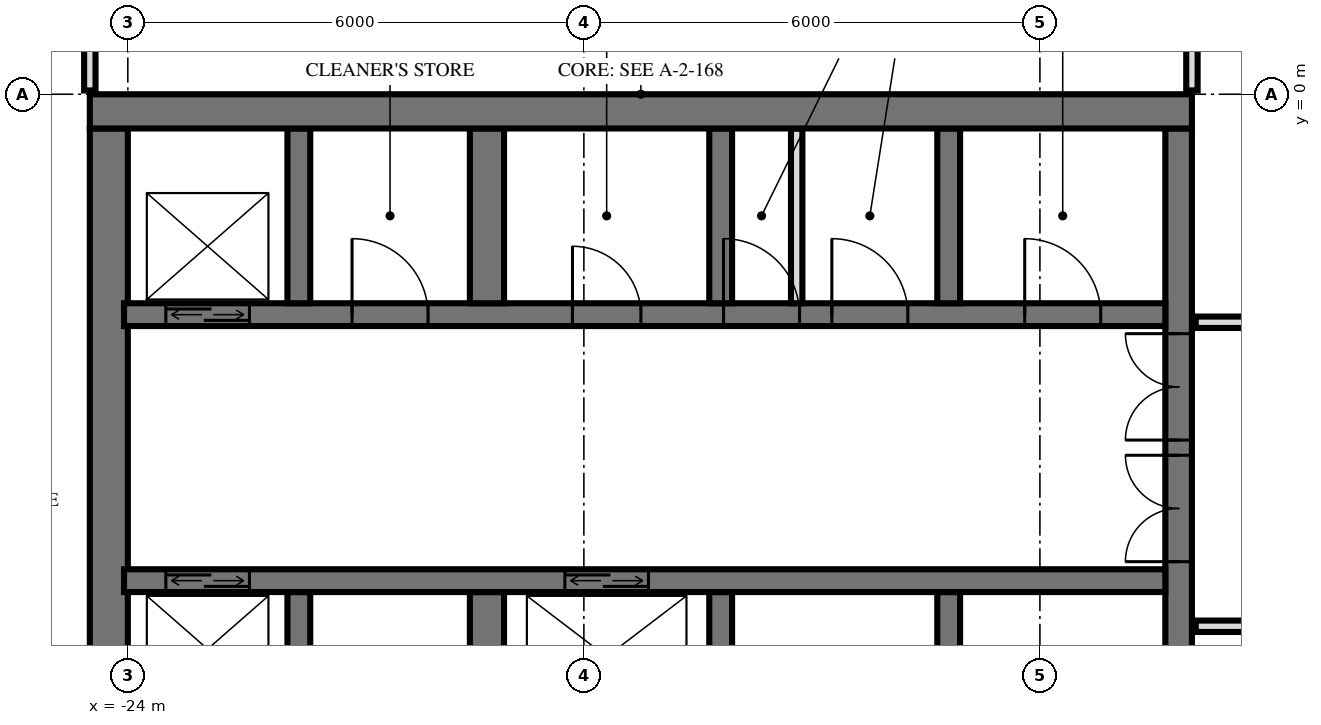
"""IFC4 building model, lengths in metres.
Left out: names, types, materials, properties, quantities, classifications, styles, units other than length and angle.
Written with IfcOpenShell. Run it as: python <this file> out.ifc"""

import sys

from ifc_helpers import new_model, si_unit, direction, frame, frame_2d, origin, place, context, subcontext, project, spatial, rectangle, extrude, element, fill, save


model = new_model("IFC4")
c1 = context("Model", 3, precision=1e-05, world=origin(), true_north=direction((0.0, 1.0)))
c2 = subcontext(c1, "Body", "Model", "MODEL_VIEW")
j1 = project(units=[si_unit("LENGTHUNIT", "METRE"), si_unit("PLANEANGLEUNIT", "RADIAN")], contexts=[c1])
p1 = place(None, origin())
s1 = spatial("IfcSite", under=j1, at=p1, CompositionType="ELEMENT")
p2 = place(p1, origin())
s2 = spatial("IfcBuilding", under=s1, at=p2, CompositionType="ELEMENT")
p3 = place(p2, frame((0.0, 0.0, 130.8)))
s3 = spatial("IfcBuildingStorey", under=s2, at=p3, CompositionType="ELEMENT", Elevation=130.8)
p4 = place(p3, frame((-24.5, -0.225, 0.0), z_axis=(0.0, 0.0, 1.0), x_axis=(1.0, 0.0, 0.0)))
e1 = element("IfcWall", 1, at=p4, inside=s3, PredefinedType="SHEAR", context=c2, shape_type="SweptSolid", body=[
    extrude(rectangle(XDim=14.5, YDim=0.45, at=frame_2d((7.25, 0.0))), origin(), (0.0, 0.0, 1.0), 3.6),
])
p5 = place(p3, frame((-10.175, -14.55, 0.0), z_axis=(0.0, 0.0, 1.0), x_axis=(0.0, 1.0, 0.0)))
e2 = element("IfcWall", 2, at=p5, inside=s3, PredefinedType="SHEAR", context=c2, shape_type="SweptSolid", body=[
    extrude(rectangle(XDim=14.1, YDim=0.35, at=frame_2d((7.05, 0.0))), origin(), (0.0, 0.0, 1.0), 3.6),
])
p6 = place(p5, frame((8.4, 0.0, 0.0)))
e3 = element("IfcOpeningElement", 3, at=p6, cuts=e2, PredefinedType="OPENING", context=c2, shape_type="SweptSolid", body=[
    extrude(rectangle(XDim=1.4, YDim=2.4, at=frame_2d((0.7, 1.2))), frame((0.0, 0.185, 0.0), z_axis=(0.0, -1.0, 0.0), x_axis=(1.0, 0.0, 0.0)), (0.0, 0.0, 1.0), 0.37),
])
p7 = place(p5, frame((10.0, 0.0, 0.0)))
e4 = element("IfcOpeningElement", 4, at=p7, cuts=e2, PredefinedType="OPENING", context=c2, shape_type="SweptSolid", body=[
    extrude(rectangle(XDim=1.4, YDim=2.4, at=frame_2d((0.7, 1.2))), frame((0.0, 0.185, 0.0), z_axis=(0.0, -1.0, 0.0), x_axis=(1.0, 0.0, 0.0)), (0.0, 0.0, 1.0), 0.37),
])
p8 = place(p5, frame((4.0, 0.0, 0.0)))
e5 = element("IfcOpeningElement", 5, at=p8, cuts=e2, PredefinedType="OPENING", context=c2, shape_type="SweptSolid", body=[
    extrude(rectangle(XDim=1.2, YDim=2.1, at=frame_2d((0.6, 1.05))), frame((0.0, 0.185, 0.0), z_axis=(0.0, -1.0, 0.0), x_axis=(1.0, 0.0, 0.0)), (0.0, 0.0, 1.0), 0.37),
])
p9 = place(p3, frame((-24.25, -14.55, 0.0), z_axis=(0.0, 0.0, 1.0), x_axis=(0.0, 1.0, 0.0)))
e6 = element("IfcWall", 6, at=p9, inside=s3, PredefinedType="SHEAR", context=c2, shape_type="SweptSolid", body=[
    extrude(rectangle(XDim=14.1, YDim=0.5, at=frame_2d((7.05, 0.0))), origin(), (0.0, 0.0, 1.0), 3.6),
])
p10 = place(p3, frame((-24.05, -2.9, 0.0), z_axis=(0.0, 0.0, 1.0), x_axis=(1.0, 0.0, 0.0)))
e7 = element("IfcWall", 7, at=p10, inside=s3, PredefinedType="SHEAR", context=c2, shape_type="SweptSolid", body=[
    extrude(rectangle(XDim=13.7, YDim=0.3, at=frame_2d((6.85, 0.0))), origin(), (0.0, 0.0, 1.0), 3.6),
])
p11 = place(p10, frame((0.55, 0.0, 0.0)))
e8 = element("IfcOpeningElement", 8, at=p11, cuts=e7, PredefinedType="OPENING", context=c2, shape_type="SweptSolid", body=[
    extrude(rectangle(XDim=1.1, YDim=2.1, at=frame_2d((0.55, 1.05))), frame((0.0, 0.16, 0.0), z_axis=(0.0, -1.0, 0.0), x_axis=(1.0, 0.0, 0.0)), (0.0, 0.0, 1.0), 0.32),
])
p12 = place(p10, frame((5.9, 0.0, 0.0)))
e9 = element("IfcOpeningElement", 9, at=p12, cuts=e7, PredefinedType="OPENING", context=c2, shape_type="SweptSolid", body=[
    extrude(rectangle(XDim=0.9, YDim=2.1, at=frame_2d((0.45, 1.05))), frame((0.0, 0.16, 0.0), z_axis=(0.0, -1.0, 0.0), x_axis=(1.0, 0.0, 0.0)), (0.0, 0.0, 1.0), 0.32),
])
p13 = place(p10, frame((11.85, 0.0, 0.0)))
e10 = element("IfcOpeningElement", 10, at=p13, cuts=e7, PredefinedType="OPENING", context=c2, shape_type="SweptSolid", body=[
    extrude(rectangle(XDim=1.0, YDim=2.1, at=frame_2d((0.5, 1.05))), frame((0.0, 0.16, 0.0), z_axis=(0.0, -1.0, 0.0), x_axis=(1.0, 0.0, 0.0)), (0.0, 0.0, 1.0), 0.32),
])
p14 = place(p10, frame((9.312, 0.0, 0.0)))
e11 = element("IfcOpeningElement", 11, at=p14, cuts=e7, PredefinedType="OPENING", context=c2, shape_type="SweptSolid", body=[
    extrude(rectangle(XDim=1.0, YDim=2.1, at=frame_2d((0.5, 1.05))), frame((0.0, 0.16, 0.0), z_axis=(0.0, -1.0, 0.0), x_axis=(1.0, 0.0, 0.0)), (0.0, 0.0, 1.0), 0.32),
])
p15 = place(p10, frame((7.887, 0.0, 0.0)))
e12 = element("IfcOpeningElement", 12, at=p15, cuts=e7, PredefinedType="OPENING", context=c2, shape_type="SweptSolid", body=[
    extrude(rectangle(XDim=1.0, YDim=2.1, at=frame_2d((0.5, 1.05))), frame((0.0, 0.16, 0.0), z_axis=(0.0, -1.0, 0.0), x_axis=(1.0, 0.0, 0.0)), (0.0, 0.0, 1.0), 0.32),
])
p16 = place(p10, frame((3.0, 0.0, 0.0)))
e13 = element("IfcOpeningElement", 13, at=p16, cuts=e7, PredefinedType="OPENING", context=c2, shape_type="SweptSolid", body=[
    extrude(rectangle(XDim=1.0, YDim=2.1, at=frame_2d((0.5, 1.05))), frame((0.0, 0.16, 0.0), z_axis=(0.0, -1.0, 0.0), x_axis=(1.0, 0.0, 0.0)), (0.0, 0.0, 1.0), 0.32),
])
p17 = place(p3, frame((-24.05, -6.4, 0.0), z_axis=(0.0, 0.0, 1.0), x_axis=(1.0, 0.0, 0.0)))
e14 = element("IfcWall", 14, at=p17, inside=s3, PredefinedType="SHEAR", context=c2, shape_type="SweptSolid", body=[
    extrude(rectangle(XDim=13.7, YDim=0.3, at=frame_2d((6.85, 0.0))), origin(), (0.0, 0.0, 1.0), 3.6),
])
p18 = place(p17, frame((0.55, 0.0, 0.0)))
e15 = element("IfcOpeningElement", 15, at=p18, cuts=e14, PredefinedType="OPENING", context=c2, shape_type="SweptSolid", body=[
    extrude(rectangle(XDim=1.1, YDim=2.1, at=frame_2d((0.55, 1.05))), frame((0.0, 0.16, 0.0), z_axis=(0.0, -1.0, 0.0), x_axis=(1.0, 0.0, 0.0)), (0.0, 0.0, 1.0), 0.32),
])
p19 = place(p17, frame((5.8, 0.0, 0.0)))
e16 = element("IfcOpeningElement", 16, at=p19, cuts=e14, PredefinedType="OPENING", context=c2, shape_type="SweptSolid", body=[
    extrude(rectangle(XDim=1.1, YDim=2.1, at=frame_2d((0.55, 1.05))), frame((0.0, 0.16, 0.0), z_axis=(0.0, -1.0, 0.0), x_axis=(1.0, 0.0, 0.0)), (0.0, 0.0, 1.0), 0.32),
])
for number, where, z_axis, x_axis in (
    (17, (-13.2, -2.75, 0.0), (0.0, 0.0, 1.0), (0.0, 1.0, 0.0)),
    (18, (-13.2, -8.85, 0.0), (0.0, 0.0, 1.0), (0.0, 1.0, 0.0)),
    (19, (-16.2, -2.75, 0.0), (0.0, 0.0, 1.0), (0.0, 1.0, 0.0)),
    (20, (-16.2, -8.85, 0.0), (0.0, 0.0, 1.0), (0.0, 1.0, 0.0)),
):
    element("IfcWall", number, at=place(p3, frame(where, z_axis=z_axis, x_axis=x_axis)), inside=s3, PredefinedType="SHEAR", context=c2, shape_type="SweptSolid", body=[
        extrude(rectangle(XDim=2.3, YDim=0.3, at=frame_2d((1.15, 0.0))), origin(), (0.0, 0.0, 1.0), 3.6),
    ])
for number, where, z_axis, x_axis in (
    (21, (-19.275, -2.75, 0.0), (0.0, 0.0, 1.0), (0.0, 1.0, 0.0)),
    (22, (-19.275, -8.85, 0.0), (0.0, 0.0, 1.0), (0.0, 1.0, 0.0)),
):
    element("IfcWall", number, at=place(p3, frame(where, z_axis=z_axis, x_axis=x_axis)), inside=s3, PredefinedType="SHEAR", context=c2, shape_type="SweptSolid", body=[
        extrude(rectangle(XDim=2.3, YDim=0.45, at=frame_2d((1.15, 0.0))), origin(), (0.0, 0.0, 1.0), 3.6),
    ])
for number, where, z_axis, x_axis in (
    (23, (-21.75, -2.75, 0.0), (0.0, 0.0, 1.0), (0.0, 1.0, 0.0)),
    (24, (-21.75, -8.85, 0.0), (0.0, 0.0, 1.0), (0.0, 1.0, 0.0)),
):
    element("IfcWall", number, at=place(p3, frame(where, z_axis=z_axis, x_axis=x_axis)), inside=s3, PredefinedType="SHEAR", context=c2, shape_type="SweptSolid", body=[
        extrude(rectangle(XDim=2.3, YDim=0.3, at=frame_2d((1.15, 0.0))), origin(), (0.0, 0.0, 1.0), 3.6),
    ])
p20 = place(p3, frame((-15.2, -2.75, 0.0), z_axis=(0.0, 0.0, 1.0), x_axis=(0.0, 1.0, 0.0)))
e25 = element("IfcWall", 25, at=p20, inside=s3, PredefinedType="PARTITIONING", context=c2, shape_type="SweptSolid", body=[
    extrude(rectangle(XDim=2.3, YDim=0.15, at=frame_2d((1.15, 0.0))), origin(), (0.0, 0.0, 1.0), 3.3),
])
p21 = place(p3, frame((-10.0, 0.05, 0.0), z_axis=(0.0, 0.0, 1.0), x_axis=(0.0, 1.0, 0.0)))
e26 = element("IfcWall", 26, at=p21, inside=s3, PredefinedType="PARTITIONING", context=c2, shape_type="SweptSolid", body=[
    extrude(rectangle(XDim=0.97, YDim=0.15, at=frame_2d((0.485, 0.0))), origin(), (0.0, 0.0, 1.0), 3.32),
])
p22 = place(p3, frame((-24.5, 0.05, 0.0), z_axis=(0.0, 0.0, 1.0), x_axis=(0.0, 1.0, 0.0)))
e27 = element("IfcWall", 27, at=p22, inside=s3, PredefinedType="PARTITIONING", context=c2, shape_type="SweptSolid", body=[
    extrude(rectangle(XDim=0.807, YDim=0.15, at=frame_2d((0.404, 0.0))), origin(), (0.0, 0.0, 1.0), 3.32),
])
p23 = place(p3, frame((-9.95, -7.0, 0.0), z_axis=(0.0, 0.0, 1.0), x_axis=(1.0, 0.0, 0.0)))
e28 = element("IfcWall", 28, at=p23, inside=s3, PredefinedType="PARTITIONING", context=c2, shape_type="SweptSolid", body=[
    extrude(rectangle(XDim=19.9, YDim=0.15, at=frame_2d((9.95, 0.0))), origin(), (0.0, 0.0, 1.0), 3.32),
])
p24 = place(p23, frame((9.45, 0.0, 0.0)))
e29 = element("IfcOpeningElement", 29, at=p24, cuts=e28, PredefinedType="OPENING", context=c2, shape_type="SweptSolid", body=[
    extrude(rectangle(XDim=1.0, YDim=2.1, at=frame_2d((0.5, 1.05))), frame((0.0, 0.085, 0.0), z_axis=(0.0, -1.0, 0.0), x_axis=(1.0, 0.0, 0.0)), (0.0, 0.0, 1.0), 0.17),
])
p25 = place(p23, frame((15.45, 0.0, 0.0)))
e30 = element("IfcOpeningElement", 30, at=p25, cuts=e28, PredefinedType="OPENING", context=c2, shape_type="SweptSolid", body=[
    extrude(rectangle(XDim=1.0, YDim=2.1, at=frame_2d((0.5, 1.05))), frame((0.0, 0.085, 0.0), z_axis=(0.0, -1.0, 0.0), x_axis=(1.0, 0.0, 0.0)), (0.0, 0.0, 1.0), 0.17),
])
p26 = place(p3, frame((-9.95, -3.0, 0.0), z_axis=(0.0, 0.0, 1.0), x_axis=(1.0, 0.0, 0.0)))
e31 = element("IfcWall", 31, at=p26, inside=s3, PredefinedType="PARTITIONING", context=c2, shape_type="SweptSolid", body=[
    extrude(rectangle(XDim=19.9, YDim=0.15, at=frame_2d((9.95, 0.0))), origin(), (0.0, 0.0, 1.0), 3.32),
])
p27 = place(p26, frame((1.7, 0.0, 0.0)))
e32 = element("IfcOpeningElement", 32, at=p27, cuts=e31, PredefinedType="OPENING", context=c2, shape_type="SweptSolid", body=[
    extrude(rectangle(XDim=1.0, YDim=2.1, at=frame_2d((0.5, 1.05))), frame((0.0, 0.085, 0.0), z_axis=(0.0, -1.0, 0.0), x_axis=(1.0, 0.0, 0.0)), (0.0, 0.0, 1.0), 0.17),
])
p28 = place(p26, frame((5.45, 0.0, 0.0)))
e33 = element("IfcOpeningElement", 33, at=p28, cuts=e31, PredefinedType="OPENING", context=c2, shape_type="SweptSolid", body=[
    extrude(rectangle(XDim=1.0, YDim=2.1, at=frame_2d((0.5, 1.05))), frame((0.0, 0.085, 0.0), z_axis=(0.0, -1.0, 0.0), x_axis=(1.0, 0.0, 0.0)), (0.0, 0.0, 1.0), 0.17),
])
p29 = place(p26, frame((8.2, 0.0, 0.0)))
e34 = element("IfcOpeningElement", 34, at=p29, cuts=e31, PredefinedType="OPENING", context=c2, shape_type="SweptSolid", body=[
    extrude(rectangle(XDim=1.0, YDim=2.1, at=frame_2d((0.5, 1.05))), frame((0.0, 0.085, 0.0), z_axis=(0.0, -1.0, 0.0), x_axis=(1.0, 0.0, 0.0)), (0.0, 0.0, 1.0), 0.17),
])
p30 = place(p26, frame((11.95, 0.0, 0.0)))
e35 = element("IfcOpeningElement", 35, at=p30, cuts=e31, PredefinedType="OPENING", context=c2, shape_type="SweptSolid", body=[
    extrude(rectangle(XDim=1.0, YDim=2.1, at=frame_2d((0.5, 1.05))), frame((0.0, 0.085, 0.0), z_axis=(0.0, -1.0, 0.0), x_axis=(1.0, 0.0, 0.0)), (0.0, 0.0, 1.0), 0.17),
])
p31 = place(p26, frame((16.95, 0.0, 0.0)))
e36 = element("IfcOpeningElement", 36, at=p31, cuts=e31, PredefinedType="OPENING", context=c2, shape_type="SweptSolid", body=[
    extrude(rectangle(XDim=1.0, YDim=2.1, at=frame_2d((0.5, 1.05))), frame((0.0, 0.085, 0.0), z_axis=(0.0, -1.0, 0.0), x_axis=(1.0, 0.0, 0.0)), (0.0, 0.0, 1.0), 0.17),
])
p32 = place(p11, origin())
e37 = element("IfcDoor", 37, at=p32, inside=s3, OperationType="DOUBLE_DOOR_SLIDING", PredefinedType="USERDEFINED", context=c2, shape_type="SweptSolid", body=[
    extrude(rectangle(XDim=1.1, YDim=2.1, at=frame_2d((0.55, 1.05))), frame((0.0, 0.025, 0.0), z_axis=(0.0, -1.0, 0.0), x_axis=(1.0, 0.0, 0.0)), (0.0, 0.0, 1.0), 0.05),
])
fill(e8, e37)
p33 = place(p18, origin())
e38 = element("IfcDoor", 38, at=p33, inside=s3, OperationType="DOUBLE_DOOR_SLIDING", PredefinedType="USERDEFINED", context=c2, shape_type="SweptSolid", body=[
    extrude(rectangle(XDim=1.1, YDim=2.1, at=frame_2d((0.55, 1.05))), frame((0.0, 0.025, 0.0), z_axis=(0.0, -1.0, 0.0), x_axis=(1.0, 0.0, 0.0)), (0.0, 0.0, 1.0), 0.05),
])
fill(e15, e38)
p34 = place(p19, origin())
e39 = element("IfcDoor", 39, at=p34, inside=s3, OperationType="DOUBLE_DOOR_SLIDING", PredefinedType="USERDEFINED", context=c2, shape_type="SweptSolid", body=[
    extrude(rectangle(XDim=1.1, YDim=2.1, at=frame_2d((0.55, 1.05))), frame((0.0, 0.025, 0.0), z_axis=(0.0, -1.0, 0.0), x_axis=(1.0, 0.0, 0.0)), (0.0, 0.0, 1.0), 0.05),
])
fill(e16, e39)
p35 = place(p6, origin())
e40 = element("IfcDoor", 40, at=p35, inside=s3, OperationType="DOUBLE_DOOR_SINGLE_SWING", PredefinedType="DOOR", context=c2, shape_type="SweptSolid", body=[
    extrude(rectangle(XDim=1.4, YDim=2.4, at=frame_2d((0.7, 1.2))), frame((0.0, 0.025, 0.0), z_axis=(0.0, -1.0, 0.0), x_axis=(1.0, 0.0, 0.0)), (0.0, 0.0, 1.0), 0.05),
])
fill(e3, e40)
p36 = place(p7, origin())
e41 = element("IfcDoor", 41, at=p36, inside=s3, OperationType="DOUBLE_DOOR_SINGLE_SWING", PredefinedType="DOOR", context=c2, shape_type="SweptSolid", body=[
    extrude(rectangle(XDim=1.4, YDim=2.4, at=frame_2d((0.7, 1.2))), frame((0.0, 0.025, 0.0), z_axis=(0.0, -1.0, 0.0), x_axis=(1.0, 0.0, 0.0)), (0.0, 0.0, 1.0), 0.05),
])
fill(e4, e41)
p37 = place(p12, origin())
e42 = element("IfcDoor", 42, at=p37, inside=s3, OperationType="SINGLE_SWING_RIGHT", PredefinedType="DOOR", context=c2, shape_type="SweptSolid", body=[
    extrude(rectangle(XDim=0.9, YDim=2.1, at=frame_2d((0.45, 1.05))), frame((0.0, 0.025, 0.0), z_axis=(0.0, -1.0, 0.0), x_axis=(1.0, 0.0, 0.0)), (0.0, 0.0, 1.0), 0.05),
])
fill(e9, e42)
p38 = place(p13, origin())
e43 = element("IfcDoor", 43, at=p38, inside=s3, OperationType="SINGLE_SWING_RIGHT", PredefinedType="DOOR", context=c2, shape_type="SweptSolid", body=[
    extrude(rectangle(XDim=1.0, YDim=2.1, at=frame_2d((0.5, 1.05))), frame((0.0, 0.025, 0.0), z_axis=(0.0, -1.0, 0.0), x_axis=(1.0, 0.0, 0.0)), (0.0, 0.0, 1.0), 0.05),
])
fill(e10, e43)
p39 = place(p14, origin())
e44 = element("IfcDoor", 44, at=p39, inside=s3, OperationType="SINGLE_SWING_RIGHT", PredefinedType="DOOR", context=c2, shape_type="SweptSolid", body=[
    extrude(rectangle(XDim=1.0, YDim=2.1, at=frame_2d((0.5, 1.05))), frame((0.0, 0.025, 0.0), z_axis=(0.0, -1.0, 0.0), x_axis=(1.0, 0.0, 0.0)), (0.0, 0.0, 1.0), 0.05),
])
fill(e11, e44)
p40 = place(p15, origin())
e45 = element("IfcDoor", 45, at=p40, inside=s3, OperationType="SINGLE_SWING_RIGHT", PredefinedType="DOOR", context=c2, shape_type="SweptSolid", body=[
    extrude(rectangle(XDim=1.0, YDim=2.1, at=frame_2d((0.5, 1.05))), frame((0.0, 0.025, 0.0), z_axis=(0.0, -1.0, 0.0), x_axis=(1.0, 0.0, 0.0)), (0.0, 0.0, 1.0), 0.05),
])
fill(e12, e45)
p41 = place(p16, origin())
e46 = element("IfcDoor", 46, at=p41, inside=s3, OperationType="SINGLE_SWING_RIGHT", PredefinedType="DOOR", context=c2, shape_type="SweptSolid", body=[
    extrude(rectangle(XDim=1.0, YDim=2.1, at=frame_2d((0.5, 1.05))), frame((0.0, 0.025, 0.0), z_axis=(0.0, -1.0, 0.0), x_axis=(1.0, 0.0, 0.0)), (0.0, 0.0, 1.0), 0.05),
])
fill(e13, e46)
save(model, sys.argv[1])
